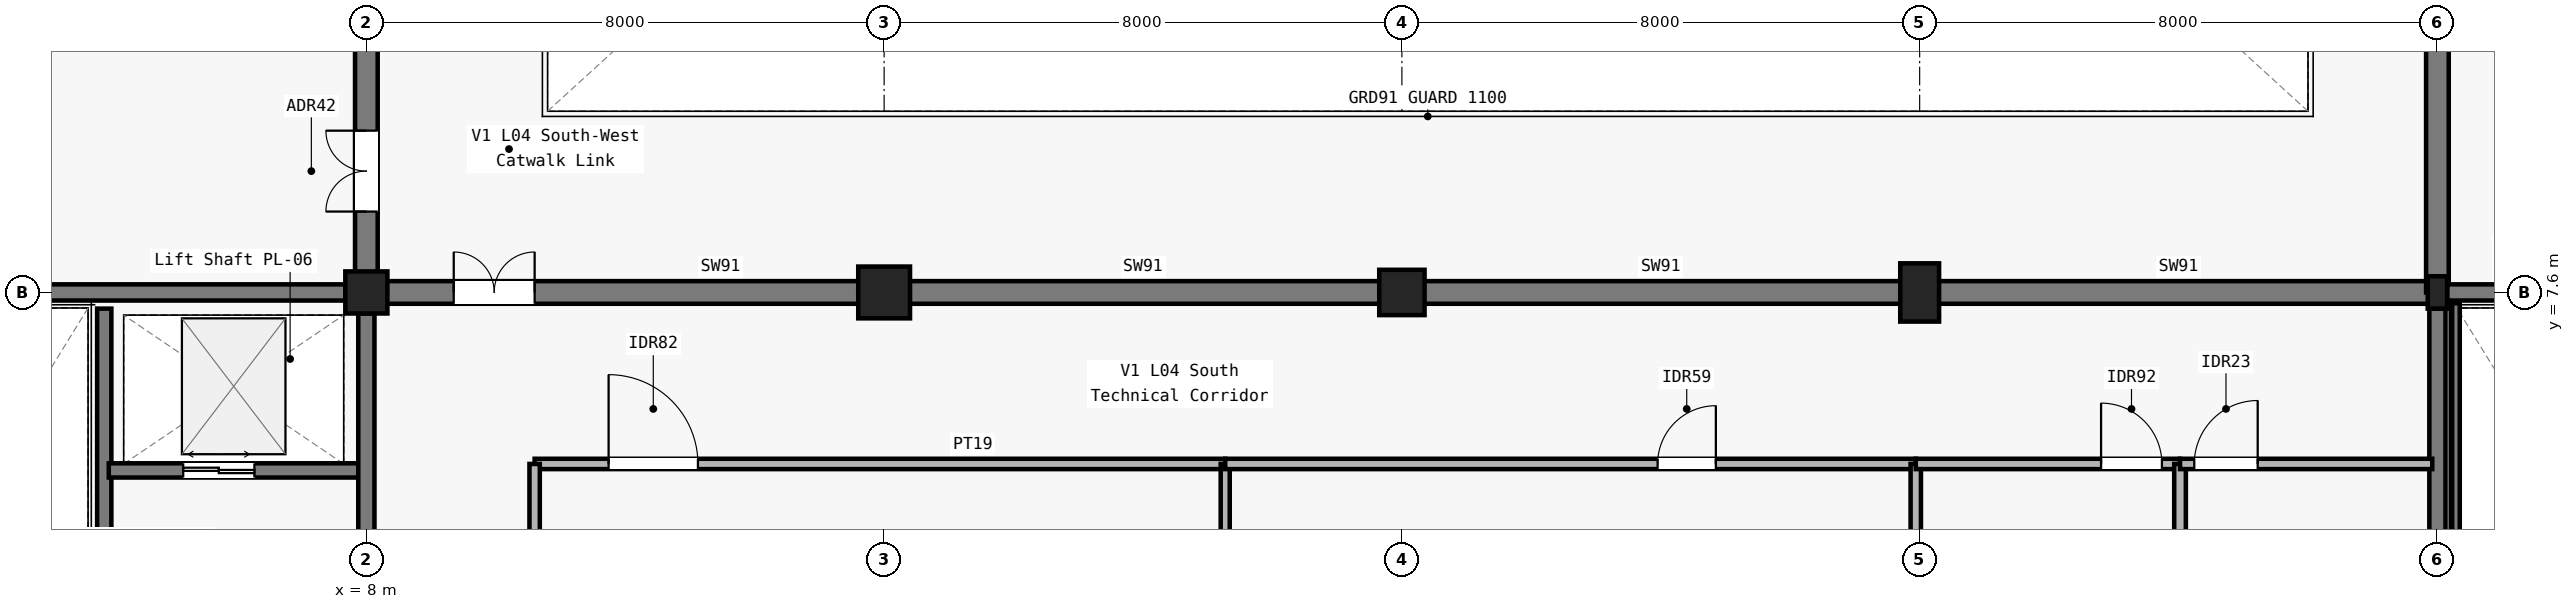
"""IFC4 building model, lengths in metres.
Left out: names, types, materials, properties, quantities, classifications, styles, units other than length and angle.
Written with IfcOpenShell. Run it as: python <this file> out.ifc"""

import sys

from ifc_helpers import new_model, si_unit, direction, frame, frame_2d, origin, origin_2d, place, context, subcontext, project, spatial, rectangle, circle, i_section, extrude, element, fill, save


model = new_model("IFC4")
c1 = context("Model", 3, precision=1e-05, world=origin(), true_north=direction((0.0, 1.0)))
c2 = subcontext(c1, "Body", "Model", "MODEL_VIEW")
j1 = project(units=[si_unit("LENGTHUNIT", "METRE"), si_unit("PLANEANGLEUNIT", "RADIAN")], contexts=[c1])
p1 = place(None, origin())
s1 = spatial("IfcSite", under=j1, at=p1, CompositionType="ELEMENT")
p2 = place(p1, origin())
s2 = spatial("IfcBuilding", under=s1, at=p2, CompositionType="ELEMENT")
p3 = place(p2, frame((0.0, 0.0, 19.8)))
s3 = spatial("IfcBuildingStorey", under=s2, at=p3, CompositionType="ELEMENT", Elevation=19.8)
p4 = place(p3, frame((8.0, 7.6, 0.0), z_axis=(0.0, 0.0, 1.0), x_axis=(1.0, 0.0, 0.0)))
e1 = element("IfcColumn", 1, at=p4, inside=s3, PredefinedType="COLUMN", context=c2, shape_type="SweptSolid", body=[
    extrude(circle(Radius=0.325, at=origin_2d()), origin(), (0.0, 0.0, 1.0), 7.0),
])
p5 = place(p3, frame((16.0, 7.6, 0.0), z_axis=(0.0, 0.0, 1.0), x_axis=(1.0, 0.0, 0.0)))
e2 = element("IfcColumn", 2, at=p5, inside=s3, PredefinedType="COLUMN", context=c2, shape_type="SweptSolid", body=[
    extrude(rectangle(XDim=0.8, YDim=0.8, at=origin_2d()), origin(), (0.0, 0.0, 1.0), 7.0),
])
p6 = place(p3, frame((24.0, 7.6, 0.0), z_axis=(0.0, 0.0, 1.0), x_axis=(1.0, 0.0, 0.0)))
e3 = element("IfcColumn", 3, at=p6, inside=s3, PredefinedType="COLUMN", context=c2, shape_type="SweptSolid", body=[
    extrude(rectangle(XDim=0.7, YDim=0.7, at=origin_2d()), origin(), (0.0, 0.0, 1.0), 7.0),
])
p7 = place(p3, frame((32.0, 7.6, 0.0), z_axis=(0.0, 0.0, 1.0), x_axis=(1.0, 0.0, 0.0)))
e4 = element("IfcColumn", 4, at=p7, inside=s3, PredefinedType="COLUMN", context=c2, shape_type="SweptSolid", body=[
    extrude(rectangle(XDim=0.6, YDim=0.9, at=origin_2d()), origin(), (0.0, 0.0, 1.0), 7.0),
])
p8 = place(p3, frame((40.0, 7.6, 0.0), z_axis=(0.0, 0.0, 1.0), x_axis=(1.0, 0.0, 0.0)))
e5 = element("IfcColumn", 5, at=p8, inside=s3, PredefinedType="COLUMN", context=c2, shape_type="SweptSolid", body=[
    extrude(i_section(OverallWidth=0.3, OverallDepth=0.5, WebThickness=0.014, FlangeThickness=0.028, FilletRadius=0.027, at=origin_2d()), origin(), (0.0, 0.0, 1.0), 7.0),
])
p9 = place(p3, frame((8.0, 7.6, 0.0), z_axis=(0.0, 0.0, 1.0), x_axis=(1.0, 0.0, 0.0)))
e6 = element("IfcWall", 6, at=p9, inside=s3, PredefinedType="SHEAR", context=c2, shape_type="SweptSolid", body=[
    extrude(rectangle(XDim=8.0, YDim=0.35, at=frame_2d((4.0, 0.0))), origin(), (0.0, 0.0, 1.0), 7.0),
])
p10 = place(p9, frame((1.35, 0.0, 0.0)))
e7 = element("IfcOpeningElement", 7, at=p10, cuts=e6, PredefinedType="OPENING", context=c2, shape_type="SweptSolid", body=[
    extrude(rectangle(XDim=1.25, YDim=2.2, at=frame_2d((0.625, 1.1))), frame((0.0, 0.185, 0.0), z_axis=(0.0, -1.0, 0.0), x_axis=(1.0, 0.0, 0.0)), (0.0, 0.0, 1.0), 0.37),
])
for number, where, z_axis, x_axis in (
    (8, (16.0, 7.6, 0.0), (0.0, 0.0, 1.0), (1.0, 0.0, 0.0)),
    (9, (24.0, 7.6, 0.0), (0.0, 0.0, 1.0), (1.0, 0.0, 0.0)),
    (10, (32.0, 7.6, 0.0), (0.0, 0.0, 1.0), (1.0, 0.0, 0.0)),
):
    element("IfcWall", number, at=place(p3, frame(where, z_axis=z_axis, x_axis=x_axis)), inside=s3, PredefinedType="SHEAR", context=c2, shape_type="SweptSolid", body=[
        extrude(rectangle(XDim=8.0, YDim=0.35, at=frame_2d((4.0, 0.0))), origin(), (0.0, 0.0, 1.0), 7.0),
    ])
p11 = place(p3, frame((8.0, 7.6, 0.0), z_axis=(0.0, 0.0, 1.0), x_axis=(0.0, 1.0, 0.0)))
e11 = element("IfcWall", 11, at=p11, inside=s3, PredefinedType="SHEAR", context=c2, shape_type="SweptSolid", body=[
    extrude(rectangle(XDim=7.6, YDim=0.35, at=frame_2d((3.8, 0.0))), origin(), (0.0, 0.0, 1.0), 7.0),
])
p12 = place(p11, frame((1.25, 0.0, 0.0)))
e12 = element("IfcOpeningElement", 12, at=p12, cuts=e11, PredefinedType="OPENING", context=c2, shape_type="SweptSolid", body=[
    extrude(rectangle(XDim=1.25, YDim=2.2, at=frame_2d((0.625, 1.1))), frame((0.0, 0.185, 0.0), z_axis=(0.0, -1.0, 0.0), x_axis=(1.0, 0.0, 0.0)), (0.0, 0.0, 1.0), 0.37),
])
p13 = place(p3, frame((40.0, 7.6, 0.0), z_axis=(0.0, 0.0, 1.0), x_axis=(0.0, 1.0, 0.0)))
e13 = element("IfcWall", 13, at=p13, inside=s3, PredefinedType="SHEAR", context=c2, shape_type="SweptSolid", body=[
    extrude(rectangle(XDim=7.6, YDim=0.35, at=frame_2d((3.8, 0.0))), origin(), (0.0, 0.0, 1.0), 7.0),
])
p14 = place(p3, frame((0.4, 7.6, 0.0), z_axis=(0.0, 0.0, 1.0), x_axis=(1.0, 0.0, 0.0)))
e14 = element("IfcWall", 14, at=p14, inside=s3, PredefinedType="SOLIDWALL", context=c2, shape_type="SweptSolid", body=[
    extrude(rectangle(XDim=7.275, YDim=0.25, at=frame_2d((3.638, 0.0))), origin(), (0.0, 0.0, 1.0), 4.54),
])
p15 = place(p3, frame((3.95, 0.25, 0.0), z_axis=(0.0, 0.0, 1.0), x_axis=(0.0, 1.0, 0.0)))
e15 = element("IfcWall", 15, at=p15, inside=s3, PredefinedType="SOLIDWALL", context=c2, shape_type="SweptSolid", body=[
    extrude(rectangle(XDim=7.1, YDim=0.22, at=frame_2d((3.55, 0.0))), origin(), (0.0, 0.0, 1.0), 4.54),
])
p16 = place(p15, frame((0.35, 0.0, 0.0)))
e16 = element("IfcOpeningElement", 16, at=p16, cuts=e15, PredefinedType="OPENING", context=c2, shape_type="SweptSolid", body=[
    extrude(rectangle(XDim=1.2, YDim=2.15, at=frame_2d((0.6, 1.075))), frame((0.0, 0.12, 0.0), z_axis=(0.0, -1.0, 0.0), x_axis=(1.0, 0.0, 0.0)), (0.0, 0.0, 1.0), 0.24),
])
p17 = place(p3, frame((4.02, 4.85, 0.0), z_axis=(0.0, 0.0, 1.0), x_axis=(1.0, 0.0, 0.0)))
e17 = element("IfcWall", 17, at=p17, inside=s3, PredefinedType="SOLIDWALL", context=c2, shape_type="SweptSolid", body=[
    extrude(rectangle(XDim=3.93, YDim=0.22, at=frame_2d((1.965, 0.0))), origin(), (0.0, 0.0, 1.0), 4.54),
])
p18 = place(p17, frame((1.15, 0.0, 0.0)))
e18 = element("IfcOpeningElement", 18, at=p18, cuts=e17, PredefinedType="OPENING", context=c2, shape_type="SweptSolid", body=[
    extrude(rectangle(XDim=1.1, YDim=2.2, at=frame_2d((0.55, 1.1))), frame((0.0, 0.12, 0.0), z_axis=(0.0, -1.0, 0.0), x_axis=(1.0, 0.0, 0.0)), (0.0, 0.0, 1.0), 0.24),
])
p19 = place(p3, frame((8.0, 0.4, 0.0), z_axis=(0.0, 0.0, 1.0), x_axis=(0.0, 1.0, 0.0)))
e19 = element("IfcWall", 19, at=p19, inside=s3, PredefinedType="SOLIDWALL", context=c2, shape_type="SweptSolid", body=[
    extrude(rectangle(XDim=6.875, YDim=0.25, at=frame_2d((3.438, 0.0))), origin(), (0.0, 0.0, 1.0), 4.54),
])
p20 = place(p19, frame((1.95, 0.0, 0.0)))
e20 = element("IfcOpeningElement", 20, at=p20, cuts=e19, PredefinedType="OPENING", context=c2, shape_type="SweptSolid", body=[
    extrude(rectangle(XDim=1.35, YDim=2.2, at=frame_2d((0.675, 1.1))), frame((0.0, 0.135, 0.0), z_axis=(0.0, -1.0, 0.0), x_axis=(1.0, 0.0, 0.0)), (0.0, 0.0, 1.0), 0.27),
])
p21 = place(p3, frame((40.0, 0.25, 0.0), z_axis=(0.0, 0.0, 1.0), x_axis=(0.0, 1.0, 0.0)))
e21 = element("IfcWall", 21, at=p21, inside=s3, PredefinedType="SOLIDWALL", context=c2, shape_type="SweptSolid", body=[
    extrude(rectangle(XDim=7.1, YDim=0.25, at=frame_2d((3.55, 0.0))), origin(), (0.0, 0.0, 1.0), 4.54),
])
p22 = place(p3, frame((40.15, 7.6, 0.0), z_axis=(0.0, 0.0, 1.0), x_axis=(1.0, 0.0, 0.0)))
e22 = element("IfcWall", 22, at=p22, inside=s3, PredefinedType="SOLIDWALL", context=c2, shape_type="SweptSolid", body=[
    extrude(rectangle(XDim=7.77, YDim=0.25, at=frame_2d((3.885, 0.0))), origin(), (0.0, 0.0, 1.0), 4.54),
])
p23 = place(p3, frame((10.6, 4.95, 0.0), z_axis=(0.0, 0.0, 1.0), x_axis=(1.0, 0.0, 0.0)))
e23 = element("IfcWall", 23, at=p23, inside=s3, PredefinedType="PARTITIONING", context=c2, shape_type="SweptSolid", body=[
    extrude(rectangle(XDim=10.67, YDim=0.16, at=frame_2d((5.335, 0.0))), origin(), (0.0, 0.0, 1.0), 4.54),
])
p24 = place(p23, frame((1.143, 0.0, 0.0)))
e24 = element("IfcOpeningElement", 24, at=p24, cuts=e23, PredefinedType="OPENING", context=c2, shape_type="SweptSolid", body=[
    extrude(rectangle(XDim=1.38, YDim=2.2, at=frame_2d((0.69, 1.1))), frame((0.0, 0.09, 0.0), z_axis=(0.0, -1.0, 0.0), x_axis=(1.0, 0.0, 0.0)), (0.0, 0.0, 1.0), 0.18),
])
p25 = place(p3, frame((21.27, 0.08, 0.0), z_axis=(0.0, 0.0, 1.0), x_axis=(0.0, 1.0, 0.0)))
e25 = element("IfcWall", 25, at=p25, inside=s3, PredefinedType="PARTITIONING", context=c2, shape_type="SweptSolid", body=[
    extrude(rectangle(XDim=4.87, YDim=0.14, at=frame_2d((2.435, 0.0))), origin(), (0.0, 0.0, 1.0), 4.54),
])
p26 = place(p3, frame((21.27, 4.95, 0.0), z_axis=(0.0, 0.0, 1.0), x_axis=(1.0, 0.0, 0.0)))
e26 = element("IfcWall", 26, at=p26, inside=s3, PredefinedType="PARTITIONING", context=c2, shape_type="SweptSolid", body=[
    extrude(rectangle(XDim=10.67, YDim=0.16, at=frame_2d((5.335, 0.0))), origin(), (0.0, 0.0, 1.0), 4.54),
])
p27 = place(p26, frame((6.681, 0.0, 0.0)))
e27 = element("IfcOpeningElement", 27, at=p27, cuts=e26, PredefinedType="OPENING", context=c2, shape_type="SweptSolid", body=[
    extrude(rectangle(XDim=0.9, YDim=2.05, at=frame_2d((0.45, 1.025))), frame((0.0, 0.09, 0.0), z_axis=(0.0, -1.0, 0.0), x_axis=(1.0, 0.0, 0.0)), (0.0, 0.0, 1.0), 0.18),
])
p28 = place(p3, frame((31.94, 0.35, 0.0), z_axis=(0.0, 0.0, 1.0), x_axis=(0.0, 1.0, 0.0)))
e28 = element("IfcWall", 28, at=p28, inside=s3, PredefinedType="PARTITIONING", context=c2, shape_type="SweptSolid", body=[
    extrude(rectangle(XDim=4.6, YDim=0.16, at=frame_2d((2.3, 0.0))), origin(), (0.0, 0.0, 1.0), 4.54),
])
p29 = place(p3, frame((31.94, 4.95, 0.0), z_axis=(0.0, 0.0, 1.0), x_axis=(1.0, 0.0, 0.0)))
e29 = element("IfcWall", 29, at=p29, inside=s3, PredefinedType="PARTITIONING", context=c2, shape_type="SweptSolid", body=[
    extrude(rectangle(XDim=4.083, YDim=0.16, at=frame_2d((2.042, 0.0))), origin(), (0.0, 0.0, 1.0), 4.54),
])
p30 = place(p29, frame((2.863, 0.0, 0.0)))
e30 = element("IfcOpeningElement", 30, at=p30, cuts=e29, PredefinedType="OPENING", context=c2, shape_type="SweptSolid", body=[
    extrude(rectangle(XDim=0.94, YDim=2.05, at=frame_2d((0.47, 1.025))), frame((0.0, 0.09, 0.0), z_axis=(0.0, -1.0, 0.0), x_axis=(1.0, 0.0, 0.0)), (0.0, 0.0, 1.0), 0.18),
])
p31 = place(p3, frame((36.023, 0.08, 0.0), z_axis=(0.0, 0.0, 1.0), x_axis=(0.0, 1.0, 0.0)))
e31 = element("IfcWall", 31, at=p31, inside=s3, PredefinedType="PARTITIONING", context=c2, shape_type="SweptSolid", body=[
    extrude(rectangle(XDim=4.87, YDim=0.18, at=frame_2d((2.435, 0.0))), origin(), (0.0, 0.0, 1.0), 4.54),
])
p32 = place(p3, frame((36.023, 4.95, 0.0), z_axis=(0.0, 0.0, 1.0), x_axis=(1.0, 0.0, 0.0)))
e32 = element("IfcWall", 32, at=p32, inside=s3, PredefinedType="PARTITIONING", context=c2, shape_type="SweptSolid", body=[
    extrude(rectangle(XDim=3.897, YDim=0.16, at=frame_2d((1.948, 0.0))), origin(), (0.0, 0.0, 1.0), 4.54),
])
p33 = place(p32, frame((0.22, 0.0, 0.0)))
e33 = element("IfcOpeningElement", 33, at=p33, cuts=e32, PredefinedType="OPENING", context=c2, shape_type="SweptSolid", body=[
    extrude(rectangle(XDim=0.98, YDim=2.05, at=frame_2d((0.49, 1.025))), frame((0.0, 0.09, 0.0), z_axis=(0.0, -1.0, 0.0), x_axis=(1.0, 0.0, 0.0)), (0.0, 0.0, 1.0), 0.18),
])
p34 = place(p3, frame((10.6, 0.08, 0.0), z_axis=(0.0, 0.0, 1.0), x_axis=(0.0, 1.0, 0.0)))
e34 = element("IfcWall", 34, at=p34, inside=s3, PredefinedType="PARTITIONING", context=c2, shape_type="SweptSolid", body=[
    extrude(rectangle(XDim=4.87, YDim=0.16, at=frame_2d((2.435, 0.0))), origin(), (0.0, 0.0, 1.0), 4.54),
])
p35 = place(p3, frame((40.275, 0.15, 0.0), z_axis=(0.0, 0.0, 1.0), x_axis=(0.0, 1.0, 0.0)))
e35 = element("IfcWall", 35, at=p35, inside=s3, PredefinedType="SOLIDWALL", context=c2, shape_type="SweptSolid", body=[
    extrude(rectangle(XDim=7.3, YDim=0.14, at=frame_2d((3.65, 0.0))), origin(), (0.0, 0.0, 1.0), 4.54),
])
p36 = place(p18, origin())
e36 = element("IfcDoor", 36, at=p36, inside=s3, OperationType="DOUBLE_DOOR_SLIDING", PredefinedType="DOOR", context=c2, shape_type="SweptSolid", body=[
    extrude(rectangle(XDim=1.1, YDim=2.2, at=frame_2d((0.55, 1.1))), frame((0.0, 0.025, 0.0), z_axis=(0.0, -1.0, 0.0), x_axis=(1.0, 0.0, 0.0)), (0.0, 0.0, 1.0), 0.05),
])
fill(e18, e36)
p37 = place(p24, origin())
e37 = element("IfcDoor", 37, at=p37, inside=s3, OperationType="SINGLE_SWING_LEFT", PredefinedType="DOOR", context=c2, shape_type="SweptSolid", body=[
    extrude(rectangle(XDim=1.38, YDim=2.2, at=frame_2d((0.69, 1.1))), frame((0.0, 0.025, 0.0), z_axis=(0.0, -1.0, 0.0), x_axis=(1.0, 0.0, 0.0)), (0.0, 0.0, 1.0), 0.05),
])
fill(e24, e37)
p38 = place(p27, origin())
e38 = element("IfcDoor", 38, at=p38, inside=s3, OperationType="SINGLE_SWING_RIGHT", PredefinedType="DOOR", context=c2, shape_type="SweptSolid", body=[
    extrude(rectangle(XDim=0.9, YDim=2.05, at=frame_2d((0.45, 1.025))), frame((0.0, 0.025, 0.0), z_axis=(0.0, -1.0, 0.0), x_axis=(1.0, 0.0, 0.0)), (0.0, 0.0, 1.0), 0.05),
])
fill(e27, e38)
p39 = place(p30, origin())
e39 = element("IfcDoor", 39, at=p39, inside=s3, OperationType="SINGLE_SWING_LEFT", PredefinedType="DOOR", context=c2, shape_type="SweptSolid", body=[
    extrude(rectangle(XDim=0.94, YDim=2.05, at=frame_2d((0.47, 1.025))), frame((0.0, 0.025, 0.0), z_axis=(0.0, -1.0, 0.0), x_axis=(1.0, 0.0, 0.0)), (0.0, 0.0, 1.0), 0.05),
])
fill(e30, e39)
p40 = place(p33, origin())
e40 = element("IfcDoor", 40, at=p40, inside=s3, OperationType="SINGLE_SWING_RIGHT", PredefinedType="DOOR", context=c2, shape_type="SweptSolid", body=[
    extrude(rectangle(XDim=0.98, YDim=2.05, at=frame_2d((0.49, 1.025))), frame((0.0, 0.025, 0.0), z_axis=(0.0, -1.0, 0.0), x_axis=(1.0, 0.0, 0.0)), (0.0, 0.0, 1.0), 0.05),
])
fill(e33, e40)
p41 = place(p12, origin())
e41 = element("IfcDoor", 41, at=p41, inside=s3, OperationType="DOUBLE_DOOR_SINGLE_SWING", PredefinedType="DOOR", context=c2, shape_type="SweptSolid", body=[
    extrude(rectangle(XDim=1.25, YDim=2.2, at=frame_2d((0.625, 1.1))), frame((0.0, 0.025, 0.0), z_axis=(0.0, -1.0, 0.0), x_axis=(1.0, 0.0, 0.0)), (0.0, 0.0, 1.0), 0.05),
])
fill(e12, e41)
p42 = place(p10, origin())
e42 = element("IfcDoor", 42, at=p42, inside=s3, OperationType="DOUBLE_DOOR_SINGLE_SWING", PredefinedType="DOOR", context=c2, shape_type="SweptSolid", body=[
    extrude(rectangle(XDim=1.25, YDim=2.2, at=frame_2d((0.625, 1.1))), frame((0.0, 0.025, 0.0), z_axis=(0.0, -1.0, 0.0), x_axis=(1.0, 0.0, 0.0)), (0.0, 0.0, 1.0), 0.05),
])
fill(e7, e42)
save(model, sys.argv[1])
